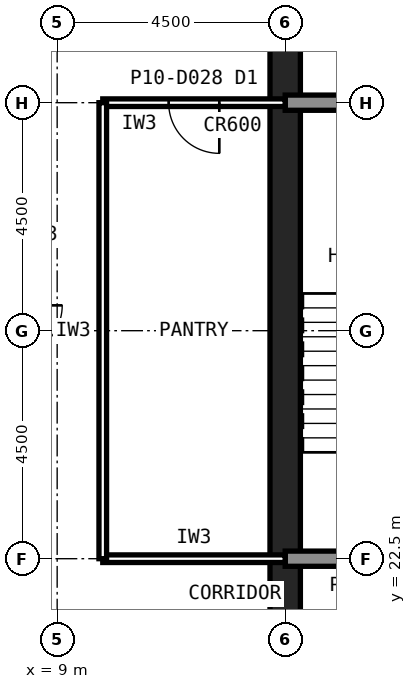
"""IFC4 building model, lengths in metres.
Left out: names, types, materials, properties, quantities, classifications, styles, units other than length and angle.
Written with IfcOpenShell. Run it as: python <this file> out.ifc"""

import sys

from ifc_helpers import new_model, si_unit, direction, frame, frame_2d, origin, place, context, subcontext, project, spatial, rectangle, extrude, element, fill, save


model = new_model("IFC4")
c1 = context("Model", 3, precision=1e-05, world=origin(), true_north=direction((0.0, 1.0)))
c2 = subcontext(c1, "Body", "Model", "MODEL_VIEW")
j1 = project(units=[si_unit("LENGTHUNIT", "METRE"), si_unit("PLANEANGLEUNIT", "RADIAN")], contexts=[c1])
p1 = place(None, origin())
s1 = spatial("IfcSite", under=j1, at=p1, CompositionType="ELEMENT")
p2 = place(p1, origin())
s2 = spatial("IfcBuilding", under=s1, at=p2, CompositionType="ELEMENT")
p3 = place(p2, frame((0.0, 0.0, 45.8)))
s3 = spatial("IfcBuildingStorey", under=s2, at=p3, CompositionType="ELEMENT", Elevation=45.8)
p4 = place(p3, frame((13.5, 40.5, 0.0), z_axis=(0.0, 0.0, 1.0), x_axis=(0.0, -1.0, 0.0)))
e1 = element("IfcWall", 1, at=p4, inside=s3, PredefinedType="SHEAR", context=c2, shape_type="SweptSolid", body=[
    extrude(rectangle(XDim=27.0, YDim=0.6, at=frame_2d((13.5, 0.0))), origin(), (0.0, 0.0, 1.0), 4.2),
])
p5 = place(p4, frame((19.65, 0.0, 0.0)))
e2 = element("IfcOpeningElement", 2, at=p5, cuts=e1, PredefinedType="OPENING", context=c2, shape_type="SweptSolid", body=[
    extrude(rectangle(XDim=1.2, YDim=2.1, at=frame_2d((0.6, 1.05))), frame((0.0, 0.31, 0.0), z_axis=(0.0, -1.0, 0.0), x_axis=(1.0, 0.0, 0.0)), (0.0, 0.0, 1.0), 0.62),
])
p6 = place(p4, frame((5.85, 0.0, 0.0)))
e3 = element("IfcOpeningElement", 3, at=p6, cuts=e1, PredefinedType="OPENING", context=c2, shape_type="SweptSolid", body=[
    extrude(rectangle(XDim=1.8, YDim=2.1, at=frame_2d((0.9, 1.05))), frame((0.0, 0.31, 0.0), z_axis=(0.0, -1.0, 0.0), x_axis=(1.0, 0.0, 0.0)), (0.0, 0.0, 1.0), 0.62),
])
p7 = place(p3, frame((13.5, 22.5, 0.0), z_axis=(0.0, 0.0, 1.0), x_axis=(1.0, 0.0, 0.0)))
e4 = element("IfcWall", 4, at=p7, inside=s3, PredefinedType="SOLIDWALL", context=c2, shape_type="SweptSolid", body=[
    extrude(rectangle(XDim=27.0, YDim=0.3, at=frame_2d((13.5, 0.0))), origin(), (0.0, 0.0, 1.0), 4.04),
])
p8 = place(p7, frame((1.65, 0.0, 0.0)))
e5 = element("IfcOpeningElement", 5, at=p8, cuts=e4, PredefinedType="OPENING", context=c2, shape_type="SweptSolid", body=[
    extrude(rectangle(XDim=1.2, YDim=2.1, at=frame_2d((0.6, 1.05))), frame((0.0, 0.16, 0.0), z_axis=(0.0, -1.0, 0.0), x_axis=(1.0, 0.0, 0.0)), (0.0, 0.0, 1.0), 0.32),
])
p9 = place(p7, frame((6.025, 0.0, 0.0)))
e6 = element("IfcOpeningElement", 6, at=p9, cuts=e4, PredefinedType="OPENING", context=c2, shape_type="SweptSolid", body=[
    extrude(rectangle(XDim=1.0, YDim=2.1, at=frame_2d((0.5, 1.05))), frame((0.0, 0.16, 0.0), z_axis=(0.0, -1.0, 0.0), x_axis=(1.0, 0.0, 0.0)), (0.0, 0.0, 1.0), 0.32),
])
p10 = place(p7, frame((10.525, 0.0, 0.0)))
e7 = element("IfcOpeningElement", 7, at=p10, cuts=e4, PredefinedType="OPENING", context=c2, shape_type="SweptSolid", body=[
    extrude(rectangle(XDim=1.0, YDim=2.1, at=frame_2d((0.5, 1.05))), frame((0.0, 0.16, 0.0), z_axis=(0.0, -1.0, 0.0), x_axis=(1.0, 0.0, 0.0)), (0.0, 0.0, 1.0), 0.32),
])
p11 = place(p7, frame((19.75, 0.0, 0.0)))
e8 = element("IfcOpeningElement", 8, at=p11, cuts=e4, PredefinedType="OPENING", context=c2, shape_type="SweptSolid", body=[
    extrude(rectangle(XDim=1.0, YDim=2.1, at=frame_2d((0.5, 1.05))), frame((0.0, 0.16, 0.0), z_axis=(0.0, -1.0, 0.0), x_axis=(1.0, 0.0, 0.0)), (0.0, 0.0, 1.0), 0.32),
])
p12 = place(p7, frame((15.05, 0.0, 0.0)))
e9 = element("IfcOpeningElement", 9, at=p12, cuts=e4, PredefinedType="OPENING", context=c2, shape_type="SweptSolid", body=[
    extrude(rectangle(XDim=1.4, YDim=2.4, at=frame_2d((0.7, 1.2))), frame((0.0, 0.16, 0.0), z_axis=(0.0, -1.0, 0.0), x_axis=(1.0, 0.0, 0.0)), (0.0, 0.0, 1.0), 0.32),
])
p13 = place(p3, frame((13.5, 31.5, 0.0), z_axis=(0.0, 0.0, 1.0), x_axis=(1.0, 0.0, 0.0)))
e10 = element("IfcWall", 10, at=p13, inside=s3, PredefinedType="SOLIDWALL", context=c2, shape_type="SweptSolid", body=[
    extrude(rectangle(XDim=27.0, YDim=0.3, at=frame_2d((13.5, 0.0))), origin(), (0.0, 0.0, 1.0), 4.04),
])
p14 = place(p13, frame((24.15, 0.0, 0.0)))
e11 = element("IfcOpeningElement", 11, at=p14, cuts=e10, PredefinedType="OPENING", context=c2, shape_type="SweptSolid", body=[
    extrude(rectangle(XDim=1.2, YDim=2.1, at=frame_2d((0.6, 1.05))), frame((0.0, 0.16, 0.0), z_axis=(0.0, -1.0, 0.0), x_axis=(1.0, 0.0, 0.0)), (0.0, 0.0, 1.0), 0.32),
])
p15 = place(p13, frame((15.3, 0.0, 0.0)))
e12 = element("IfcOpeningElement", 12, at=p15, cuts=e10, PredefinedType="OPENING", context=c2, shape_type="SweptSolid", body=[
    extrude(rectangle(XDim=0.9, YDim=2.1, at=frame_2d((0.45, 1.05))), frame((0.0, 0.16, 0.0), z_axis=(0.0, -1.0, 0.0), x_axis=(1.0, 0.0, 0.0)), (0.0, 0.0, 1.0), 0.32),
])
p16 = place(p13, frame((19.8, 0.0, 0.0)))
e13 = element("IfcOpeningElement", 13, at=p16, cuts=e10, PredefinedType="OPENING", context=c2, shape_type="SweptSolid", body=[
    extrude(rectangle(XDim=0.9, YDim=2.1, at=frame_2d((0.45, 1.05))), frame((0.0, 0.16, 0.0), z_axis=(0.0, -1.0, 0.0), x_axis=(1.0, 0.0, 0.0)), (0.0, 0.0, 1.0), 0.32),
])
p17 = place(p3, frame((9.9, 22.5, 0.0), z_axis=(0.0, 0.0, 1.0), x_axis=(1.0, 0.0, 0.0)))
e14 = element("IfcWall", 14, at=p17, inside=s3, PredefinedType="PARTITIONING", context=c2, shape_type="SweptSolid", body=[
    extrude(rectangle(XDim=3.6, YDim=0.15, at=frame_2d((1.8, 0.0))), origin(), (0.0, 0.0, 1.0), 3.189),
])
p18 = place(p3, frame((13.5, 31.5, 0.0), z_axis=(0.0, 0.0, 1.0), x_axis=(-1.0, 0.0, 0.0)))
e15 = element("IfcWall", 15, at=p18, inside=s3, PredefinedType="PARTITIONING", context=c2, shape_type="SweptSolid", body=[
    extrude(rectangle(XDim=3.6, YDim=0.15, at=frame_2d((1.8, 0.0))), origin(), (0.0, 0.0, 1.0), 3.189),
])
p19 = place(p18, frame((1.3, 0.0, 0.0)))
e16 = element("IfcOpeningElement", 16, at=p19, cuts=e15, PredefinedType="OPENING", context=c2, shape_type="SweptSolid", body=[
    extrude(rectangle(XDim=1.0, YDim=2.1, at=frame_2d((0.5, 1.05))), frame((0.0, 0.085, 0.0), z_axis=(0.0, -1.0, 0.0), x_axis=(1.0, 0.0, 0.0)), (0.0, 0.0, 1.0), 0.17),
])
p20 = place(p3, frame((9.9, 31.5, 0.0), z_axis=(0.0, 0.0, 1.0), x_axis=(0.0, -1.0, 0.0)))
e17 = element("IfcWall", 17, at=p20, inside=s3, PredefinedType="PARTITIONING", context=c2, shape_type="SweptSolid", body=[
    extrude(rectangle(XDim=9.0, YDim=0.15, at=frame_2d((4.5, 0.0))), origin(), (0.0, 0.0, 1.0), 4.04),
])
p21 = place(p19, origin())
e18 = element("IfcDoor", 18, at=p21, inside=s3, OperationType="SINGLE_SWING_LEFT", PredefinedType="DOOR", context=c2, shape_type="SweptSolid", body=[
    extrude(rectangle(XDim=1.0, YDim=2.1, at=frame_2d((0.5, 1.05))), frame((0.0, 0.025, 0.0), z_axis=(0.0, -1.0, 0.0), x_axis=(1.0, 0.0, 0.0)), (0.0, 0.0, 1.0), 0.05),
])
fill(e16, e18)
save(model, sys.argv[1])
